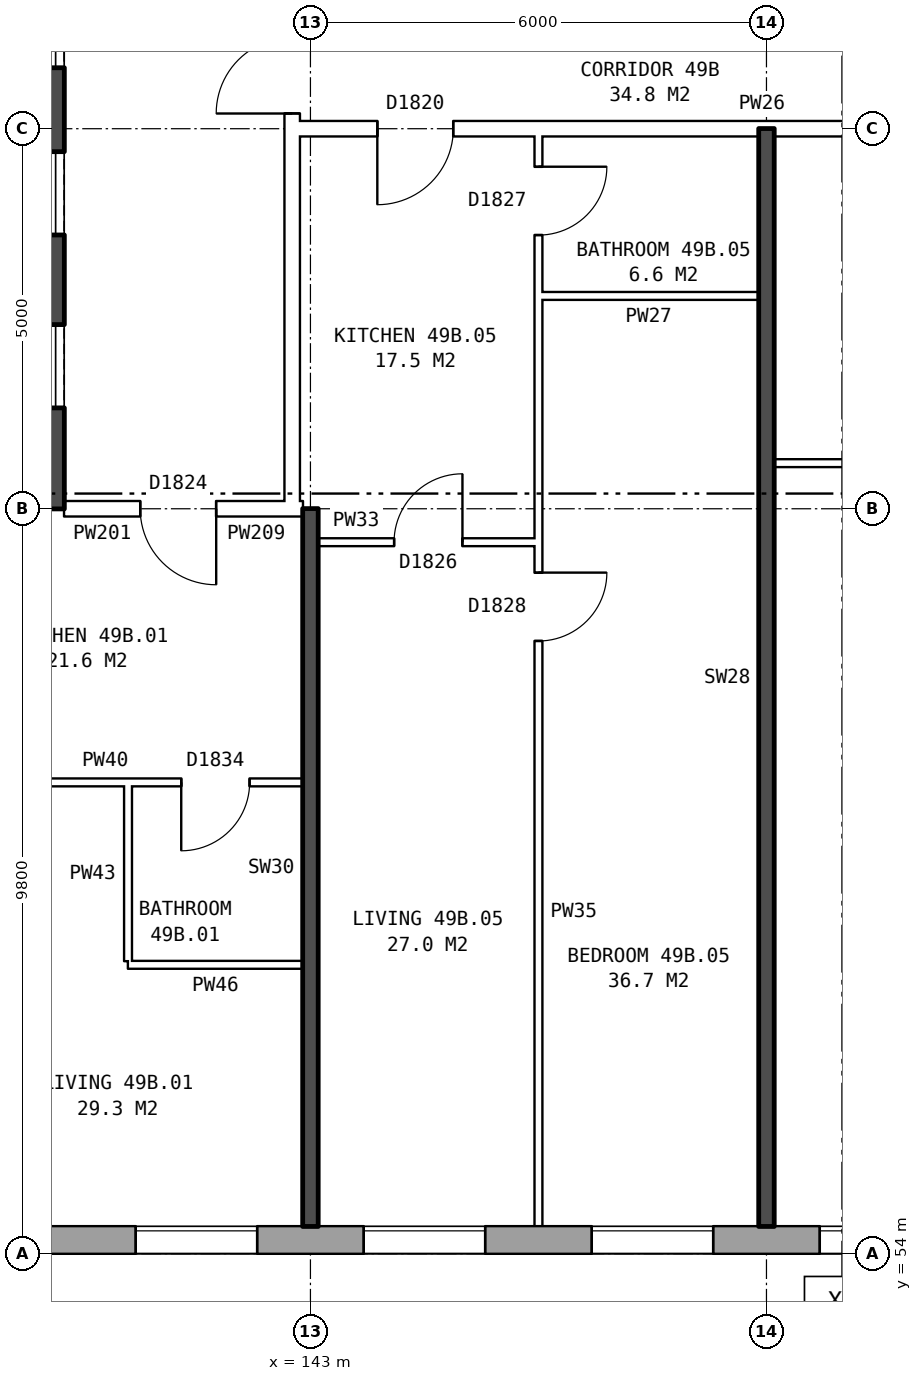
"""IFC4 building model, lengths in metres.
Left out: names, types, materials, properties, quantities, classifications, styles, units other than length and angle.
Written with IfcOpenShell. Run it as: python <this file> out.ifc"""

import sys

from ifc_helpers import new_model, si_unit, direction, frame, frame_2d, origin, place, context, subcontext, project, spatial, rectangle, extrude, element, fill, save


model = new_model("IFC4")
c1 = context("Model", 3, precision=1e-05, world=origin(), true_north=direction((0.0, 1.0)))
c2 = subcontext(c1, "Body", "Model", "MODEL_VIEW")
j1 = project(units=[si_unit("LENGTHUNIT", "METRE"), si_unit("PLANEANGLEUNIT", "RADIAN")], contexts=[c1])
p1 = place(None, origin())
s1 = spatial("IfcSite", under=j1, at=p1, CompositionType="ELEMENT")
p2 = place(p1, origin())
s2 = spatial("IfcBuilding", under=s1, at=p2, CompositionType="ELEMENT")
p3 = place(p2, frame((0.0, 0.0, 175.8)))
s3 = spatial("IfcBuildingStorey", under=s2, at=p3, CompositionType="ELEMENT", Elevation=175.8)
p4 = place(p3, frame((134.075, 54.18, 0.0), z_axis=(0.0, 0.0, 1.0), x_axis=(1.0, 0.0, 0.0)))
e1 = element("IfcWall", 1, at=p4, inside=s3, PredefinedType="STANDARD", context=c2, shape_type="SweptSolid", body=[
    extrude(rectangle(XDim=33.101, YDim=0.36, at=frame_2d((16.55, 0.0))), origin(), (0.0, 0.0, 1.0), 2.85),
])
p5 = place(p4, frame((0.3, 0.0, 0.8)))
e2 = element("IfcOpeningElement", 2, at=p5, cuts=e1, PredefinedType="OPENING", context=c2, shape_type="SweptSolid", body=[
    extrude(rectangle(XDim=0.6, YDim=1.8, at=frame_2d((0.3, 0.9))), frame((0.0, 0.19, 0.0), z_axis=(0.0, -1.0, 0.0), x_axis=(1.0, 0.0, 0.0)), (0.0, 0.0, 1.0), 0.38),
])
p6 = place(p4, frame((3.625, 0.0, 0.8)))
e3 = element("IfcOpeningElement", 3, at=p6, cuts=e1, PredefinedType="OPENING", context=c2, shape_type="SweptSolid", body=[
    extrude(rectangle(XDim=1.6, YDim=1.8, at=frame_2d((0.8, 0.9))), frame((0.0, 0.19, 0.0), z_axis=(0.0, -1.0, 0.0), x_axis=(1.0, 0.0, 0.0)), (0.0, 0.0, 1.0), 0.38),
])
p7 = place(p4, frame((6.625, 0.0, 0.8)))
e4 = element("IfcOpeningElement", 4, at=p7, cuts=e1, PredefinedType="OPENING", context=c2, shape_type="SweptSolid", body=[
    extrude(rectangle(XDim=1.6, YDim=1.8, at=frame_2d((0.8, 0.9))), frame((0.0, 0.19, 0.0), z_axis=(0.0, -1.0, 0.0), x_axis=(1.0, 0.0, 0.0)), (0.0, 0.0, 1.0), 0.38),
])
p8 = place(p4, frame((9.625, 0.0, 0.8)))
e5 = element("IfcOpeningElement", 5, at=p8, cuts=e1, PredefinedType="OPENING", context=c2, shape_type="SweptSolid", body=[
    extrude(rectangle(XDim=1.6, YDim=1.8, at=frame_2d((0.8, 0.9))), frame((0.0, 0.19, 0.0), z_axis=(0.0, -1.0, 0.0), x_axis=(1.0, 0.0, 0.0)), (0.0, 0.0, 1.0), 0.38),
])
p9 = place(p4, frame((12.625, 0.0, 0.8)))
e6 = element("IfcOpeningElement", 6, at=p9, cuts=e1, PredefinedType="OPENING", context=c2, shape_type="SweptSolid", body=[
    extrude(rectangle(XDim=1.6, YDim=1.8, at=frame_2d((0.8, 0.9))), frame((0.0, 0.19, 0.0), z_axis=(0.0, -1.0, 0.0), x_axis=(1.0, 0.0, 0.0)), (0.0, 0.0, 1.0), 0.38),
])
p10 = place(p4, frame((15.625, 0.0, 0.8)))
e7 = element("IfcOpeningElement", 7, at=p10, cuts=e1, PredefinedType="OPENING", context=c2, shape_type="SweptSolid", body=[
    extrude(rectangle(XDim=1.6, YDim=1.8, at=frame_2d((0.8, 0.9))), frame((0.0, 0.19, 0.0), z_axis=(0.0, -1.0, 0.0), x_axis=(1.0, 0.0, 0.0)), (0.0, 0.0, 1.0), 0.38),
])
p11 = place(p4, frame((18.625, 0.0, 0.8)))
e8 = element("IfcOpeningElement", 8, at=p11, cuts=e1, PredefinedType="OPENING", context=c2, shape_type="SweptSolid", body=[
    extrude(rectangle(XDim=1.6, YDim=1.8, at=frame_2d((0.8, 0.9))), frame((0.0, 0.19, 0.0), z_axis=(0.0, -1.0, 0.0), x_axis=(1.0, 0.0, 0.0)), (0.0, 0.0, 1.0), 0.38),
])
p12 = place(p4, frame((21.625, 0.0, 0.8)))
e9 = element("IfcOpeningElement", 9, at=p12, cuts=e1, PredefinedType="OPENING", context=c2, shape_type="SweptSolid", body=[
    extrude(rectangle(XDim=1.6, YDim=1.8, at=frame_2d((0.8, 0.9))), frame((0.0, 0.19, 0.0), z_axis=(0.0, -1.0, 0.0), x_axis=(1.0, 0.0, 0.0)), (0.0, 0.0, 1.0), 0.38),
])
p13 = place(p4, frame((24.625, 0.0, 0.8)))
e10 = element("IfcOpeningElement", 10, at=p13, cuts=e1, PredefinedType="OPENING", context=c2, shape_type="SweptSolid", body=[
    extrude(rectangle(XDim=1.6, YDim=1.8, at=frame_2d((0.8, 0.9))), frame((0.0, 0.19, 0.0), z_axis=(0.0, -1.0, 0.0), x_axis=(1.0, 0.0, 0.0)), (0.0, 0.0, 1.0), 0.38),
])
p14 = place(p4, frame((27.625, 0.0, 0.8)))
e11 = element("IfcOpeningElement", 11, at=p14, cuts=e1, PredefinedType="OPENING", context=c2, shape_type="SweptSolid", body=[
    extrude(rectangle(XDim=1.6, YDim=1.8, at=frame_2d((0.8, 0.9))), frame((0.0, 0.19, 0.0), z_axis=(0.0, -1.0, 0.0), x_axis=(1.0, 0.0, 0.0)), (0.0, 0.0, 1.0), 0.38),
])
p15 = place(p4, frame((29.525, 0.0, 0.8)))
e12 = element("IfcOpeningElement", 12, at=p15, cuts=e1, PredefinedType="OPENING", context=c2, shape_type="SweptSolid", body=[
    extrude(rectangle(XDim=0.6, YDim=0.9, at=frame_2d((0.3, 0.45))), frame((0.0, 0.19, 0.0), z_axis=(0.0, -1.0, 0.0), x_axis=(1.0, 0.0, 0.0)), (0.0, 0.0, 1.0), 0.38),
])
p16 = place(p4, frame((1.2, 0.0, 1.7)))
e13 = element("IfcOpeningElement", 13, at=p16, cuts=e1, PredefinedType="OPENING", context=c2, shape_type="SweptSolid", body=[
    extrude(rectangle(XDim=0.6, YDim=0.9, at=frame_2d((0.3, 0.45))), frame((0.0, 0.19, 0.0), z_axis=(0.0, -1.0, 0.0), x_axis=(1.0, 0.0, 0.0)), (0.0, 0.0, 1.0), 0.38),
])
p17 = place(p4, frame((31.575, 0.0, 1.4)))
e14 = element("IfcOpeningElement", 14, at=p17, cuts=e1, PredefinedType="OPENING", context=c2, shape_type="SweptSolid", body=[
    extrude(rectangle(XDim=1.2, YDim=1.2, at=frame_2d((0.6, 0.6))), frame((0.0, 0.19, 0.0), z_axis=(0.0, -1.0, 0.0), x_axis=(1.0, 0.0, 0.0)), (0.0, 0.0, 1.0), 0.38),
])
p18 = place(p3, frame((139.535, 63.8, 0.0), z_axis=(0.0, 0.0, 1.0), x_axis=(0.0, 1.0, 0.0)))
e15 = element("IfcWall", 15, at=p18, inside=s3, PredefinedType="SHEAR", context=c2, shape_type="SweptSolid", body=[
    extrude(rectangle(XDim=12.4, YDim=0.45, at=frame_2d((6.2, 0.0))), origin(), (0.0, 0.0, 1.0), 2.85),
])
p19 = place(p18, frame((1.325, 0.0, 0.0)))
e16 = element("IfcOpeningElement", 16, at=p19, cuts=e15, PredefinedType="OPENING", context=c2, shape_type="SweptSolid", body=[
    extrude(rectangle(XDim=1.1, YDim=2.1, at=frame_2d((0.55, 1.05))), frame((0.0, 0.235, 0.0), z_axis=(0.0, -1.0, 0.0), x_axis=(1.0, 0.0, 0.0)), (0.0, 0.0, 1.0), 0.47),
])
p20 = place(p18, frame((3.6, 0.0, 0.0)))
e17 = element("IfcOpeningElement", 17, at=p20, cuts=e15, PredefinedType="OPENING", context=c2, shape_type="SweptSolid", body=[
    extrude(rectangle(XDim=1.1, YDim=2.1, at=frame_2d((0.55, 1.05))), frame((0.0, 0.235, 0.0), z_axis=(0.0, -1.0, 0.0), x_axis=(1.0, 0.0, 0.0)), (0.0, 0.0, 1.0), 0.47),
])
p21 = place(p18, frame((5.8, 0.0, 0.0)))
e18 = element("IfcOpeningElement", 18, at=p21, cuts=e15, PredefinedType="OPENING", context=c2, shape_type="SweptSolid", body=[
    extrude(rectangle(XDim=1.1, YDim=2.1, at=frame_2d((0.55, 1.05))), frame((0.0, 0.235, 0.0), z_axis=(0.0, -1.0, 0.0), x_axis=(1.0, 0.0, 0.0)), (0.0, 0.0, 1.0), 0.47),
])
p22 = place(p18, frame((9.9, 0.0, 0.0)))
e19 = element("IfcOpeningElement", 19, at=p22, cuts=e15, PredefinedType="OPENING", context=c2, shape_type="SweptSolid", body=[
    extrude(rectangle(XDim=1.1, YDim=2.1, at=frame_2d((0.55, 1.05))), frame((0.0, 0.235, 0.0), z_axis=(0.0, -1.0, 0.0), x_axis=(1.0, 0.0, 0.0)), (0.0, 0.0, 1.0), 0.47),
])
p23 = place(p18, frame((8.125, 0.0, 0.0)))
e20 = element("IfcOpeningElement", 20, at=p23, cuts=e15, PredefinedType="OPENING", context=c2, shape_type="SweptSolid", body=[
    extrude(rectangle(XDim=0.85, YDim=2.1, at=frame_2d((0.425, 1.05))), frame((0.0, 0.235, 0.0), z_axis=(0.0, -1.0, 0.0), x_axis=(1.0, 0.0, 0.0)), (0.0, 0.0, 1.0), 0.47),
])
p24 = place(p3, frame((142.76, 63.9, 0.0), z_axis=(0.0, 0.0, 1.0), x_axis=(0.0, 1.0, 0.0)))
e21 = element("IfcWall", 21, at=p24, inside=s3, PredefinedType="PARTITIONING", context=c2, shape_type="SweptSolid", body=[
    extrude(rectangle(XDim=12.2, YDim=0.2, at=frame_2d((6.1, 0.0))), origin(), (0.0, 0.0, 1.0), 2.85),
])
p25 = place(p24, frame((5.1, 0.0, 0.0)))
e22 = element("IfcOpeningElement", 22, at=p25, cuts=e21, PredefinedType="OPENING", context=c2, shape_type="SweptSolid", body=[
    extrude(rectangle(XDim=2.0, YDim=2.1, at=frame_2d((1.0, 1.05))), frame((0.0, 0.11, 0.0), z_axis=(0.0, -1.0, 0.0), x_axis=(1.0, 0.0, 0.0)), (0.0, 0.0, 1.0), 0.22),
])
p26 = place(p3, frame((140.6, 57.8, 0.0), z_axis=(0.0, 0.0, 1.0), x_axis=(1.0, 0.0, 0.0)))
e23 = element("IfcWall", 23, at=p26, inside=s3, PredefinedType="PARTITIONING", context=c2, shape_type="SweptSolid", body=[
    extrude(rectangle(XDim=2.3, YDim=0.1, at=frame_2d((1.15, 0.0))), origin(), (0.0, 0.0, 1.0), 2.85),
])
p27 = place(p3, frame((137.1, 60.2, 0.0), z_axis=(0.0, 0.0, 1.0), x_axis=(1.0, 0.0, 0.0)))
e24 = element("IfcWall", 24, at=p27, inside=s3, PredefinedType="PARTITIONING", context=c2, shape_type="SweptSolid", body=[
    extrude(rectangle(XDim=5.8, YDim=0.1, at=frame_2d((2.9, 0.0))), origin(), (0.0, 0.0, 1.0), 2.85),
])
p28 = place(p27, frame((1.3, 0.0, 0.0)))
e25 = element("IfcOpeningElement", 25, at=p28, cuts=e24, PredefinedType="OPENING", context=c2, shape_type="SweptSolid", body=[
    extrude(rectangle(XDim=0.9, YDim=2.1, at=frame_2d((0.45, 1.05))), frame((0.0, 0.06, 0.0), z_axis=(0.0, -1.0, 0.0), x_axis=(1.0, 0.0, 0.0)), (0.0, 0.0, 1.0), 0.12),
])
p29 = place(p27, frame((4.2, 0.0, 0.0)))
e26 = element("IfcOpeningElement", 26, at=p29, cuts=e24, PredefinedType="OPENING", context=c2, shape_type="SweptSolid", body=[
    extrude(rectangle(XDim=0.9, YDim=2.1, at=frame_2d((0.45, 1.05))), frame((0.0, 0.06, 0.0), z_axis=(0.0, -1.0, 0.0), x_axis=(1.0, 0.0, 0.0)), (0.0, 0.0, 1.0), 0.12),
])
p30 = place(p3, frame((143.1, 63.36, 0.0), z_axis=(0.0, 0.0, 1.0), x_axis=(1.0, 0.0, 0.0)))
e27 = element("IfcWall", 27, at=p30, inside=s3, PredefinedType="PARTITIONING", context=c2, shape_type="SweptSolid", body=[
    extrude(rectangle(XDim=2.9, YDim=0.1, at=frame_2d((1.45, 0.0))), origin(), (0.0, 0.0, 1.0), 2.85),
])
p31 = place(p30, frame((1.0, 0.0, 0.0)))
e28 = element("IfcOpeningElement", 28, at=p31, cuts=e27, PredefinedType="OPENING", context=c2, shape_type="SweptSolid", body=[
    extrude(rectangle(XDim=0.9, YDim=2.1, at=frame_2d((0.45, 1.05))), frame((0.0, 0.06, 0.0), z_axis=(0.0, -1.0, 0.0), x_axis=(1.0, 0.0, 0.0)), (0.0, 0.0, 1.0), 0.12),
])
p32 = place(p3, frame((139.76, 63.8, 0.0), z_axis=(0.0, 0.0, 1.0), x_axis=(1.0, 0.0, 0.0)))
e29 = element("IfcWall", 29, at=p32, inside=s3, PredefinedType="PARTITIONING", context=c2, shape_type="SweptSolid", body=[
    extrude(rectangle(XDim=3.0, YDim=0.2, at=frame_2d((1.5, 0.0))), origin(), (0.0, 0.0, 1.0), 2.85),
])
p33 = place(p32, frame((1.0, 0.0, 0.0)))
e30 = element("IfcOpeningElement", 30, at=p33, cuts=e29, PredefinedType="OPENING", context=c2, shape_type="SweptSolid", body=[
    extrude(rectangle(XDim=1.0, YDim=2.1, at=frame_2d((0.5, 1.05))), frame((0.0, 0.11, 0.0), z_axis=(0.0, -1.0, 0.0), x_axis=(1.0, 0.0, 0.0)), (0.0, 0.0, 1.0), 0.22),
])
p34 = place(p3, frame((142.76, 63.8, 0.0), z_axis=(0.0, 0.0, 1.0), x_axis=(1.0, 0.0, 0.0)))
e31 = element("IfcWall", 31, at=p34, inside=s3, PredefinedType="PARTITIONING", context=c2, shape_type="SweptSolid", body=[
    extrude(rectangle(XDim=0.14, YDim=0.2, at=frame_2d((0.07, 0.0))), origin(), (0.0, 0.0, 1.0), 2.85),
])
for number, where, z_axis, x_axis in (
    (32, (149.1, 64.4, 0.0), (0.0, 0.0, 1.0), (1.0, 0.0, 0.0)),
    (33, (146.0, 66.6, 0.0), (0.0, 0.0, 1.0), (1.0, 0.0, 0.0)),
):
    element("IfcWall", number, at=place(p3, frame(where, z_axis=z_axis, x_axis=x_axis)), inside=s3, PredefinedType="PARTITIONING", context=c2, shape_type="SweptSolid", body=[
        extrude(rectangle(XDim=2.9, YDim=0.1, at=frame_2d((1.45, 0.0))), origin(), (0.0, 0.0, 1.0), 2.85),
    ])
p35 = place(p3, frame((142.76, 68.8, 0.0), z_axis=(0.0, 0.0, 1.0), x_axis=(1.0, 0.0, 0.0)))
e34 = element("IfcWall", 34, at=p35, inside=s3, PredefinedType="PARTITIONING", context=c2, shape_type="SweptSolid", body=[
    extrude(rectangle(XDim=14.48, YDim=0.2, at=frame_2d((7.24, 0.0))), origin(), (0.0, 0.0, 1.0), 2.85),
])
p36 = place(p35, frame((1.12, 0.0, 0.0)))
e35 = element("IfcOpeningElement", 35, at=p36, cuts=e34, PredefinedType="OPENING", context=c2, shape_type="SweptSolid", body=[
    extrude(rectangle(XDim=1.0, YDim=2.1, at=frame_2d((0.5, 1.05))), frame((0.0, 0.11, 0.0), z_axis=(0.0, -1.0, 0.0), x_axis=(1.0, 0.0, 0.0)), (0.0, 0.0, 1.0), 0.22),
])
p37 = place(p35, frame((10.24, 0.0, 0.0)))
e36 = element("IfcOpeningElement", 36, at=p37, cuts=e34, PredefinedType="OPENING", context=c2, shape_type="SweptSolid", body=[
    extrude(rectangle(XDim=1.0, YDim=2.1, at=frame_2d((0.5, 1.05))), frame((0.0, 0.11, 0.0), z_axis=(0.0, -1.0, 0.0), x_axis=(1.0, 0.0, 0.0)), (0.0, 0.0, 1.0), 0.22),
])
p38 = place(p3, frame((140.6, 57.85, 0.0), z_axis=(0.0, 0.0, 1.0), x_axis=(0.0, 1.0, 0.0)))
e37 = element("IfcWall", 37, at=p38, inside=s3, PredefinedType="PARTITIONING", context=c2, shape_type="SweptSolid", body=[
    extrude(rectangle(XDim=2.3, YDim=0.1, at=frame_2d((1.15, 0.0))), origin(), (0.0, 0.0, 1.0), 2.85),
])
p39 = place(p3, frame((143.0, 54.36, 0.0), z_axis=(0.0, 0.0, 1.0), x_axis=(0.0, 1.0, 0.0)))
e38 = element("IfcWall", 38, at=p39, inside=s3, PredefinedType="SOLIDWALL", context=c2, shape_type="SweptSolid", body=[
    extrude(rectangle(XDim=9.44, YDim=0.2, at=frame_2d((4.72, 0.0))), origin(), (0.0, 0.0, 1.0), 2.85),
])
p40 = place(p3, frame((146.0, 54.36, 0.0), z_axis=(0.0, 0.0, 1.0), x_axis=(0.0, 1.0, 0.0)))
e39 = element("IfcWall", 39, at=p40, inside=s3, PredefinedType="PARTITIONING", context=c2, shape_type="SweptSolid", body=[
    extrude(rectangle(XDim=14.34, YDim=0.1, at=frame_2d((7.17, 0.0))), origin(), (0.0, 0.0, 1.0), 2.85),
])
p41 = place(p40, frame((7.7, 0.0, 0.0)))
e40 = element("IfcOpeningElement", 40, at=p41, cuts=e39, PredefinedType="OPENING", context=c2, shape_type="SweptSolid", body=[
    extrude(rectangle(XDim=0.9, YDim=2.1, at=frame_2d((0.45, 1.05))), frame((0.0, 0.06, 0.0), z_axis=(0.0, -1.0, 0.0), x_axis=(1.0, 0.0, 0.0)), (0.0, 0.0, 1.0), 0.12),
])
p42 = place(p40, frame((13.04, 0.0, 0.0)))
e41 = element("IfcOpeningElement", 41, at=p42, cuts=e39, PredefinedType="OPENING", context=c2, shape_type="SweptSolid", body=[
    extrude(rectangle(XDim=0.9, YDim=2.1, at=frame_2d((0.45, 1.05))), frame((0.0, 0.06, 0.0), z_axis=(0.0, -1.0, 0.0), x_axis=(1.0, 0.0, 0.0)), (0.0, 0.0, 1.0), 0.12),
])
p43 = place(p3, frame((149.0, 54.36, 0.0), z_axis=(0.0, 0.0, 1.0), x_axis=(0.0, 1.0, 0.0)))
e42 = element("IfcWall", 42, at=p43, inside=s3, PredefinedType="SOLIDWALL", context=c2, shape_type="SweptSolid", body=[
    extrude(rectangle(XDim=14.44, YDim=0.2, at=frame_2d((7.22, 0.0))), origin(), (0.0, 0.0, 1.0), 2.85),
])
p44 = place(p7, origin())
e43 = element("IfcWindow", 43, at=p44, inside=s3, PartitioningType="SINGLE_PANEL", PredefinedType="WINDOW", context=c2, shape_type="SweptSolid", body=[
    extrude(rectangle(XDim=1.6, YDim=1.8, at=frame_2d((0.8, 0.9))), frame((0.0, 0.15, 0.0), z_axis=(0.0, -1.0, 0.0), x_axis=(1.0, 0.0, 0.0)), (0.0, 0.0, 1.0), 0.06),
])
fill(e4, e43)
p45 = place(p8, origin())
e44 = element("IfcWindow", 44, at=p45, inside=s3, PartitioningType="SINGLE_PANEL", PredefinedType="WINDOW", context=c2, shape_type="SweptSolid", body=[
    extrude(rectangle(XDim=1.6, YDim=1.8, at=frame_2d((0.8, 0.9))), frame((0.0, 0.15, 0.0), z_axis=(0.0, -1.0, 0.0), x_axis=(1.0, 0.0, 0.0)), (0.0, 0.0, 1.0), 0.06),
])
fill(e5, e44)
p46 = place(p9, origin())
e45 = element("IfcWindow", 45, at=p46, inside=s3, PartitioningType="SINGLE_PANEL", PredefinedType="WINDOW", context=c2, shape_type="SweptSolid", body=[
    extrude(rectangle(XDim=1.6, YDim=1.8, at=frame_2d((0.8, 0.9))), frame((0.0, 0.15, 0.0), z_axis=(0.0, -1.0, 0.0), x_axis=(1.0, 0.0, 0.0)), (0.0, 0.0, 1.0), 0.06),
])
fill(e6, e45)
p47 = place(p10, origin())
e46 = element("IfcWindow", 46, at=p47, inside=s3, PartitioningType="SINGLE_PANEL", PredefinedType="WINDOW", context=c2, shape_type="SweptSolid", body=[
    extrude(rectangle(XDim=1.6, YDim=1.8, at=frame_2d((0.8, 0.9))), frame((0.0, 0.15, 0.0), z_axis=(0.0, -1.0, 0.0), x_axis=(1.0, 0.0, 0.0)), (0.0, 0.0, 1.0), 0.06),
])
fill(e7, e46)
p48 = place(p25, origin())
e47 = element("IfcDoor", 47, at=p48, inside=s3, OperationType="DOUBLE_DOOR_SINGLE_SWING", PredefinedType="DOOR", context=c2, shape_type="SweptSolid", body=[
    extrude(rectangle(XDim=2.0, YDim=2.1, at=frame_2d((1.0, 1.05))), frame((0.0, 0.025, 0.0), z_axis=(0.0, -1.0, 0.0), x_axis=(1.0, 0.0, 0.0)), (0.0, 0.0, 1.0), 0.05),
])
fill(e22, e47)
p49 = place(p33, frame((1.0, 0.0, 0.0), z_axis=(0.0, 0.0, 1.0), x_axis=(-1.0, 0.0, 0.0)))
e48 = element("IfcDoor", 48, at=p49, inside=s3, OperationType="SINGLE_SWING_LEFT", PredefinedType="DOOR", context=c2, shape_type="SweptSolid", body=[
    extrude(rectangle(XDim=1.0, YDim=2.1, at=frame_2d((0.5, 1.05))), frame((0.0, 0.025, 0.0), z_axis=(0.0, -1.0, 0.0), x_axis=(1.0, 0.0, 0.0)), (0.0, 0.0, 1.0), 0.05),
])
fill(e30, e48)
p50 = place(p29, frame((0.9, 0.0, 0.0), z_axis=(0.0, 0.0, 1.0), x_axis=(-1.0, 0.0, 0.0)))
e49 = element("IfcDoor", 49, at=p50, inside=s3, OperationType="SINGLE_SWING_RIGHT", PredefinedType="DOOR", context=c2, shape_type="SweptSolid", body=[
    extrude(rectangle(XDim=0.9, YDim=2.1, at=frame_2d((0.45, 1.05))), frame((0.0, 0.025, 0.0), z_axis=(0.0, -1.0, 0.0), x_axis=(1.0, 0.0, 0.0)), (0.0, 0.0, 1.0), 0.05),
])
fill(e26, e49)
p51 = place(p41, frame((0.9, 0.0, 0.0), z_axis=(0.0, 0.0, 1.0), x_axis=(-1.0, 0.0, 0.0)))
e50 = element("IfcDoor", 50, at=p51, inside=s3, OperationType="SINGLE_SWING_LEFT", PredefinedType="DOOR", context=c2, shape_type="SweptSolid", body=[
    extrude(rectangle(XDim=0.9, YDim=2.1, at=frame_2d((0.45, 1.05))), frame((0.0, 0.025, 0.0), z_axis=(0.0, -1.0, 0.0), x_axis=(1.0, 0.0, 0.0)), (0.0, 0.0, 1.0), 0.05),
])
fill(e40, e50)
p52 = place(p36, frame((1.0, 0.0, 0.0), z_axis=(0.0, 0.0, 1.0), x_axis=(-1.0, 0.0, 0.0)))
e51 = element("IfcDoor", 51, at=p52, inside=s3, OperationType="SINGLE_SWING_RIGHT", PredefinedType="DOOR", context=c2, shape_type="SweptSolid", body=[
    extrude(rectangle(XDim=1.0, YDim=2.1, at=frame_2d((0.5, 1.05))), frame((0.0, 0.025, 0.0), z_axis=(0.0, -1.0, 0.0), x_axis=(1.0, 0.0, 0.0)), (0.0, 0.0, 1.0), 0.05),
])
fill(e35, e51)
p53 = place(p31, origin())
e52 = element("IfcDoor", 52, at=p53, inside=s3, OperationType="SINGLE_SWING_RIGHT", PredefinedType="DOOR", context=c2, shape_type="SweptSolid", body=[
    extrude(rectangle(XDim=0.9, YDim=2.1, at=frame_2d((0.45, 1.05))), frame((0.0, 0.025, 0.0), z_axis=(0.0, -1.0, 0.0), x_axis=(1.0, 0.0, 0.0)), (0.0, 0.0, 1.0), 0.05),
])
fill(e28, e52)
p54 = place(p42, frame((0.9, 0.0, 0.0), z_axis=(0.0, 0.0, 1.0), x_axis=(-1.0, 0.0, 0.0)))
e53 = element("IfcDoor", 53, at=p54, inside=s3, OperationType="SINGLE_SWING_LEFT", PredefinedType="DOOR", context=c2, shape_type="SweptSolid", body=[
    extrude(rectangle(XDim=0.9, YDim=2.1, at=frame_2d((0.45, 1.05))), frame((0.0, 0.025, 0.0), z_axis=(0.0, -1.0, 0.0), x_axis=(1.0, 0.0, 0.0)), (0.0, 0.0, 1.0), 0.05),
])
fill(e41, e53)
save(model, sys.argv[1])
